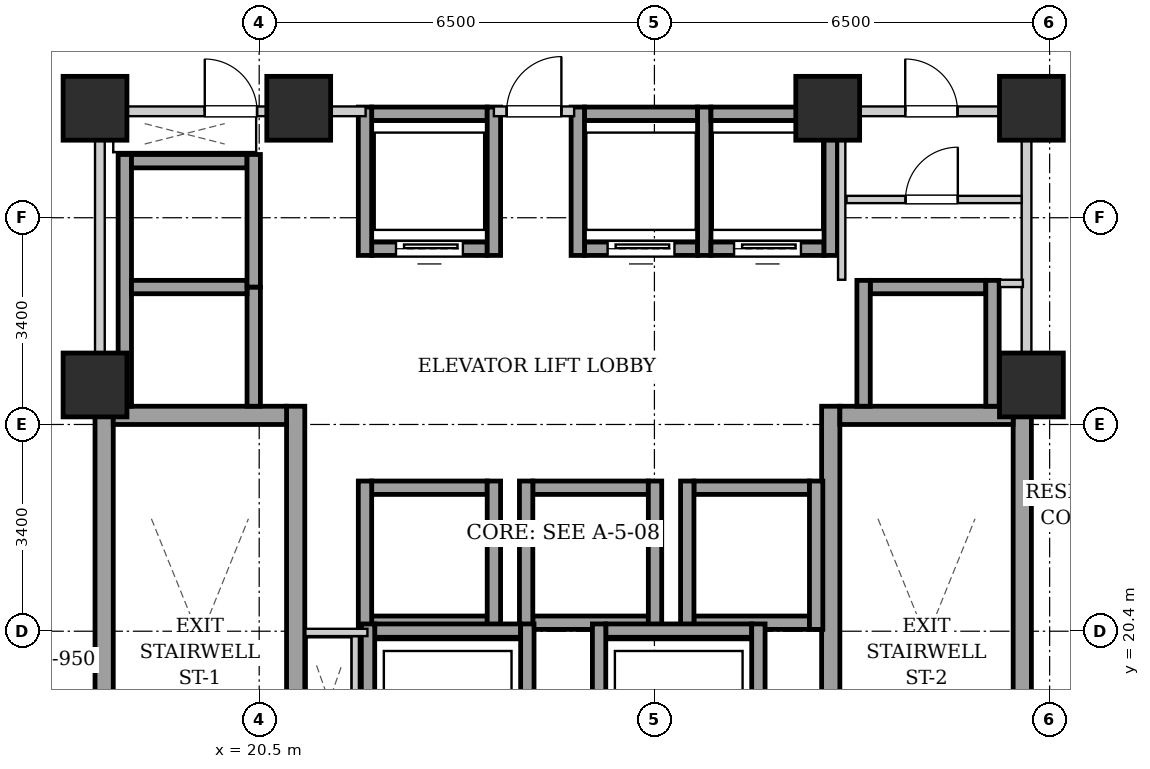
"""IFC4 building model, lengths in metres.
Left out: names, types, materials, properties, quantities, classifications, styles, units other than length and angle.
Written with IfcOpenShell. Run it as: python <this file> out.ifc"""

import sys

from ifc_helpers import new_model, si_unit, direction, frame, frame_2d, origin, origin_2d, place, context, subcontext, project, spatial, rectangle, extrude, element, fill, save


model = new_model("IFC4")
c1 = context("Model", 3, precision=1e-05, world=origin(), true_north=direction((0.0, 1.0)))
c2 = subcontext(c1, "Body", "Model", "MODEL_VIEW")
j1 = project(units=[si_unit("LENGTHUNIT", "METRE"), si_unit("PLANEANGLEUNIT", "RADIAN")], contexts=[c1])
p1 = place(None, origin())
s1 = spatial("IfcSite", under=j1, at=p1, CompositionType="ELEMENT")
p2 = place(p1, origin())
s2 = spatial("IfcBuilding", under=s1, at=p2, CompositionType="ELEMENT")
p3 = place(p2, frame((0.0, 0.0, 81.5)))
s3 = spatial("IfcBuildingStorey", under=s2, at=p3, CompositionType="ELEMENT", Elevation=81.5)
for number, where, z_axis, x_axis in (
    (1, (17.8, 29.0, 0.0), (0.0, 0.0, 1.0), (1.0, 0.0, 0.0)),
    (2, (21.15, 29.0, 0.0), (0.0, 0.0, 1.0), (1.0, 0.0, 0.0)),
    (3, (29.85, 29.0, 0.0), (0.0, 0.0, 1.0), (1.0, 0.0, 0.0)),
    (4, (33.2, 29.0, 0.0), (0.0, 0.0, 1.0), (1.0, 0.0, 0.0)),
    (5, (17.8, 24.45, 0.0), (0.0, 0.0, 1.0), (1.0, 0.0, 0.0)),
    (6, (33.2, 24.45, 0.0), (0.0, 0.0, 1.0), (1.0, 0.0, 0.0)),
):
    element("IfcColumn", number, at=place(p3, frame(where, z_axis=z_axis, x_axis=x_axis)), inside=s3, PredefinedType="COLUMN", context=c2, shape_type="SweptSolid", body=[
        extrude(rectangle(XDim=1.05, YDim=1.05, at=origin_2d()), origin(), (0.0, 0.0, 1.0), 3.2),
    ])
for number, where, z_axis, x_axis in (
    (7, (17.95, 15.1, 0.0), (0.0, 0.0, 1.0), (0.0, 1.0, 0.0)),
    (8, (21.1, 15.1, 0.0), (0.0, 0.0, 1.0), (0.0, 1.0, 0.0)),
):
    element("IfcWall", number, at=place(p3, frame(where, z_axis=z_axis, x_axis=x_axis)), inside=s3, PredefinedType="SHEAR", context=c2, shape_type="SweptSolid", body=[
        extrude(rectangle(XDim=9.0, YDim=0.3, at=frame_2d((4.5, 0.0))), origin(), (0.0, 0.0, 1.0), 2.94),
    ])
p4 = place(p3, frame((18.1, 23.95, 0.0), z_axis=(0.0, 0.0, 1.0), x_axis=(1.0, 0.0, 0.0)))
e9 = element("IfcWall", 9, at=p4, inside=s3, PredefinedType="SHEAR", context=c2, shape_type="SweptSolid", body=[
    extrude(rectangle(XDim=2.85, YDim=0.3, at=frame_2d((1.425, 0.0))), origin(), (0.0, 0.0, 1.0), 2.94),
])
for number, where, z_axis, x_axis in (
    (10, (29.9, 15.1, 0.0), (0.0, 0.0, 1.0), (0.0, 1.0, 0.0)),
    (11, (33.05, 15.1, 0.0), (0.0, 0.0, 1.0), (0.0, 1.0, 0.0)),
):
    element("IfcWall", number, at=place(p3, frame(where, z_axis=z_axis, x_axis=x_axis)), inside=s3, PredefinedType="SHEAR", context=c2, shape_type="SweptSolid", body=[
        extrude(rectangle(XDim=9.0, YDim=0.3, at=frame_2d((4.5, 0.0))), origin(), (0.0, 0.0, 1.0), 2.94),
    ])
p5 = place(p3, frame((30.05, 23.95, 0.0), z_axis=(0.0, 0.0, 1.0), x_axis=(1.0, 0.0, 0.0)))
e12 = element("IfcWall", 12, at=p5, inside=s3, PredefinedType="SHEAR", context=c2, shape_type="SweptSolid", body=[
    extrude(rectangle(XDim=2.85, YDim=0.3, at=frame_2d((1.425, 0.0))), origin(), (0.0, 0.0, 1.0), 2.94),
])
p6 = place(p3, frame((22.35, 26.69, 0.0), z_axis=(0.0, 0.0, 1.0), x_axis=(1.0, 0.0, 0.0)))
e13 = element("IfcWall", 13, at=p6, inside=s3, PredefinedType="SHEAR", context=c2, shape_type="SweptSolid", body=[
    extrude(rectangle(XDim=1.9, YDim=0.22, at=frame_2d((0.95, 0.0))), origin(), (0.0, 0.0, 1.0), 2.94),
])
p7 = place(p6, frame((0.4, 0.0, 0.0)))
e14 = element("IfcOpeningElement", 14, at=p7, cuts=e13, PredefinedType="OPENING", context=c2, shape_type="SweptSolid", body=[
    extrude(rectangle(XDim=1.1, YDim=2.15, at=frame_2d((0.55, 1.075))), frame((0.0, 0.12, 0.0), z_axis=(0.0, -1.0, 0.0), x_axis=(1.0, 0.0, 0.0)), (0.0, 0.0, 1.0), 0.24),
])
p8 = place(p3, frame((22.35, 28.91, 0.0), z_axis=(0.0, 0.0, 1.0), x_axis=(1.0, 0.0, 0.0)))
e15 = element("IfcWall", 15, at=p8, inside=s3, PredefinedType="SHEAR", context=c2, shape_type="SweptSolid", body=[
    extrude(rectangle(XDim=1.9, YDim=0.22, at=frame_2d((0.95, 0.0))), origin(), (0.0, 0.0, 1.0), 2.94),
])
for number, where, z_axis, x_axis in (
    (16, (22.24, 26.58, 0.0), (0.0, 0.0, 1.0), (0.0, 1.0, 0.0)),
    (17, (24.36, 26.58, 0.0), (0.0, 0.0, 1.0), (0.0, 1.0, 0.0)),
):
    element("IfcWall", number, at=place(p3, frame(where, z_axis=z_axis, x_axis=x_axis)), inside=s3, PredefinedType="SHEAR", context=c2, shape_type="SweptSolid", body=[
        extrude(rectangle(XDim=2.44, YDim=0.22, at=frame_2d((1.22, 0.0))), origin(), (0.0, 0.0, 1.0), 2.94),
    ])
p9 = place(p3, frame((25.85, 26.69, 0.0), z_axis=(0.0, 0.0, 1.0), x_axis=(1.0, 0.0, 0.0)))
e18 = element("IfcWall", 18, at=p9, inside=s3, PredefinedType="SHEAR", context=c2, shape_type="SweptSolid", body=[
    extrude(rectangle(XDim=1.86, YDim=0.22, at=frame_2d((0.93, 0.0))), origin(), (0.0, 0.0, 1.0), 2.94),
])
p10 = place(p9, frame((0.38, 0.0, 0.0)))
e19 = element("IfcOpeningElement", 19, at=p10, cuts=e18, PredefinedType="OPENING", context=c2, shape_type="SweptSolid", body=[
    extrude(rectangle(XDim=1.1, YDim=2.15, at=frame_2d((0.55, 1.075))), frame((0.0, 0.12, 0.0), z_axis=(0.0, -1.0, 0.0), x_axis=(1.0, 0.0, 0.0)), (0.0, 0.0, 1.0), 0.24),
])
p11 = place(p3, frame((25.85, 28.91, 0.0), z_axis=(0.0, 0.0, 1.0), x_axis=(1.0, 0.0, 0.0)))
e20 = element("IfcWall", 20, at=p11, inside=s3, PredefinedType="SHEAR", context=c2, shape_type="SweptSolid", body=[
    extrude(rectangle(XDim=1.86, YDim=0.22, at=frame_2d((0.93, 0.0))), origin(), (0.0, 0.0, 1.0), 2.94),
])
for number, where, z_axis, x_axis in (
    (21, (25.74, 26.58, 0.0), (0.0, 0.0, 1.0), (0.0, 1.0, 0.0)),
    (22, (27.82, 26.58, 0.0), (0.0, 0.0, 1.0), (0.0, 1.0, 0.0)),
):
    element("IfcWall", number, at=place(p3, frame(where, z_axis=z_axis, x_axis=x_axis)), inside=s3, PredefinedType="SHEAR", context=c2, shape_type="SweptSolid", body=[
        extrude(rectangle(XDim=2.44, YDim=0.22, at=frame_2d((1.22, 0.0))), origin(), (0.0, 0.0, 1.0), 2.94),
    ])
p12 = place(p3, frame((27.93, 26.69, 0.0), z_axis=(0.0, 0.0, 1.0), x_axis=(1.0, 0.0, 0.0)))
e23 = element("IfcWall", 23, at=p12, inside=s3, PredefinedType="SHEAR", context=c2, shape_type="SweptSolid", body=[
    extrude(rectangle(XDim=1.86, YDim=0.22, at=frame_2d((0.93, 0.0))), origin(), (0.0, 0.0, 1.0), 2.94),
])
p13 = place(p12, frame((0.38, 0.0, 0.0)))
e24 = element("IfcOpeningElement", 24, at=p13, cuts=e23, PredefinedType="OPENING", context=c2, shape_type="SweptSolid", body=[
    extrude(rectangle(XDim=1.1, YDim=2.15, at=frame_2d((0.55, 1.075))), frame((0.0, 0.12, 0.0), z_axis=(0.0, -1.0, 0.0), x_axis=(1.0, 0.0, 0.0)), (0.0, 0.0, 1.0), 0.24),
])
p14 = place(p3, frame((27.93, 28.91, 0.0), z_axis=(0.0, 0.0, 1.0), x_axis=(1.0, 0.0, 0.0)))
e25 = element("IfcWall", 25, at=p14, inside=s3, PredefinedType="SHEAR", context=c2, shape_type="SweptSolid", body=[
    extrude(rectangle(XDim=1.86, YDim=0.22, at=frame_2d((0.93, 0.0))), origin(), (0.0, 0.0, 1.0), 2.94),
])
p15 = place(p3, frame((29.9, 26.58, 0.0), z_axis=(0.0, 0.0, 1.0), x_axis=(0.0, 1.0, 0.0)))
e26 = element("IfcWall", 26, at=p15, inside=s3, PredefinedType="SHEAR", context=c2, shape_type="SweptSolid", body=[
    extrude(rectangle(XDim=2.44, YDim=0.22, at=frame_2d((1.22, 0.0))), origin(), (0.0, 0.0, 1.0), 2.94),
])
for number, where, z_axis, x_axis in (
    (27, (22.35, 20.54, 0.0), (0.0, 0.0, 1.0), (1.0, 0.0, 0.0)),
    (28, (22.35, 22.76, 0.0), (0.0, 0.0, 1.0), (1.0, 0.0, 0.0)),
):
    element("IfcWall", number, at=place(p3, frame(where, z_axis=z_axis, x_axis=x_axis)), inside=s3, PredefinedType="SHEAR", context=c2, shape_type="SweptSolid", body=[
        extrude(rectangle(XDim=1.9, YDim=0.22, at=frame_2d((0.95, 0.0))), origin(), (0.0, 0.0, 1.0), 2.94),
    ])
for number, where, z_axis, x_axis in (
    (29, (22.24, 20.43, 0.0), (0.0, 0.0, 1.0), (0.0, 1.0, 0.0)),
    (30, (24.36, 20.43, 0.0), (0.0, 0.0, 1.0), (0.0, 1.0, 0.0)),
):
    element("IfcWall", number, at=place(p3, frame(where, z_axis=z_axis, x_axis=x_axis)), inside=s3, PredefinedType="SHEAR", context=c2, shape_type="SweptSolid", body=[
        extrude(rectangle(XDim=2.44, YDim=0.22, at=frame_2d((1.22, 0.0))), origin(), (0.0, 0.0, 1.0), 2.94),
    ])
for number, where, z_axis, x_axis in (
    (31, (25.0, 20.54, 0.0), (0.0, 0.0, 1.0), (1.0, 0.0, 0.0)),
    (32, (25.0, 22.76, 0.0), (0.0, 0.0, 1.0), (1.0, 0.0, 0.0)),
):
    element("IfcWall", number, at=place(p3, frame(where, z_axis=z_axis, x_axis=x_axis)), inside=s3, PredefinedType="SHEAR", context=c2, shape_type="SweptSolid", body=[
        extrude(rectangle(XDim=1.9, YDim=0.22, at=frame_2d((0.95, 0.0))), origin(), (0.0, 0.0, 1.0), 2.94),
    ])
for number, where, z_axis, x_axis in (
    (33, (24.89, 20.43, 0.0), (0.0, 0.0, 1.0), (0.0, 1.0, 0.0)),
    (34, (27.01, 20.43, 0.0), (0.0, 0.0, 1.0), (0.0, 1.0, 0.0)),
):
    element("IfcWall", number, at=place(p3, frame(where, z_axis=z_axis, x_axis=x_axis)), inside=s3, PredefinedType="SHEAR", context=c2, shape_type="SweptSolid", body=[
        extrude(rectangle(XDim=2.44, YDim=0.22, at=frame_2d((1.22, 0.0))), origin(), (0.0, 0.0, 1.0), 2.94),
    ])
for number, where, z_axis, x_axis in (
    (35, (27.65, 20.54, 0.0), (0.0, 0.0, 1.0), (1.0, 0.0, 0.0)),
    (36, (27.65, 22.76, 0.0), (0.0, 0.0, 1.0), (1.0, 0.0, 0.0)),
):
    element("IfcWall", number, at=place(p3, frame(where, z_axis=z_axis, x_axis=x_axis)), inside=s3, PredefinedType="SHEAR", context=c2, shape_type="SweptSolid", body=[
        extrude(rectangle(XDim=1.9, YDim=0.22, at=frame_2d((0.95, 0.0))), origin(), (0.0, 0.0, 1.0), 2.94),
    ])
for number, where, z_axis, x_axis in (
    (37, (27.54, 20.43, 0.0), (0.0, 0.0, 1.0), (0.0, 1.0, 0.0)),
    (38, (29.66, 20.43, 0.0), (0.0, 0.0, 1.0), (0.0, 1.0, 0.0)),
):
    element("IfcWall", number, at=place(p3, frame(where, z_axis=z_axis, x_axis=x_axis)), inside=s3, PredefinedType="SHEAR", context=c2, shape_type="SweptSolid", body=[
        extrude(rectangle(XDim=2.44, YDim=0.22, at=frame_2d((1.22, 0.0))), origin(), (0.0, 0.0, 1.0), 2.94),
    ])
p16 = place(p3, frame((18.29, 24.1, 0.0), z_axis=(0.0, 0.0, 1.0), x_axis=(0.0, 1.0, 0.0)))
e39 = element("IfcWall", 39, at=p16, inside=s3, PredefinedType="SHEAR", context=c2, shape_type="SweptSolid", body=[
    extrude(rectangle(XDim=4.14, YDim=0.22, at=frame_2d((2.07, 0.0))), origin(), (0.0, 0.0, 1.0), 2.94),
])
p17 = place(p3, frame((20.41, 24.1, 0.0), z_axis=(0.0, 0.0, 1.0), x_axis=(0.0, 1.0, 0.0)))
e40 = element("IfcWall", 40, at=p17, inside=s3, PredefinedType="SHEAR", context=c2, shape_type="SweptSolid", body=[
    extrude(rectangle(XDim=1.96, YDim=0.22, at=frame_2d((0.98, 0.0))), origin(), (0.0, 0.0, 1.0), 2.94),
])
for number, where, z_axis, x_axis in (
    (41, (18.4, 26.06, 0.0), (0.0, 0.0, 1.0), (1.0, 0.0, 0.0)),
    (42, (18.4, 28.13, 0.0), (0.0, 0.0, 1.0), (1.0, 0.0, 0.0)),
):
    element("IfcWall", number, at=place(p3, frame(where, z_axis=z_axis, x_axis=x_axis)), inside=s3, PredefinedType="SHEAR", context=c2, shape_type="SweptSolid", body=[
        extrude(rectangle(XDim=1.9, YDim=0.22, at=frame_2d((0.95, 0.0))), origin(), (0.0, 0.0, 1.0), 2.94),
    ])
p18 = place(p3, frame((20.41, 26.06, 0.0), z_axis=(0.0, 0.0, 1.0), x_axis=(0.0, 1.0, 0.0)))
e43 = element("IfcWall", 43, at=p18, inside=s3, PredefinedType="SHEAR", context=c2, shape_type="SweptSolid", body=[
    extrude(rectangle(XDim=2.18, YDim=0.22, at=frame_2d((1.09, 0.0))), origin(), (0.0, 0.0, 1.0), 2.94),
])
p19 = place(p3, frame((30.55, 26.06, 0.0), z_axis=(0.0, 0.0, 1.0), x_axis=(1.0, 0.0, 0.0)))
e44 = element("IfcWall", 44, at=p19, inside=s3, PredefinedType="SHEAR", context=c2, shape_type="SweptSolid", body=[
    extrude(rectangle(XDim=1.9, YDim=0.22, at=frame_2d((0.95, 0.0))), origin(), (0.0, 0.0, 1.0), 2.94),
])
for number, where, z_axis, x_axis in (
    (45, (30.44, 24.1, 0.0), (0.0, 0.0, 1.0), (0.0, 1.0, 0.0)),
    (46, (32.56, 24.1, 0.0), (0.0, 0.0, 1.0), (0.0, 1.0, 0.0)),
):
    element("IfcWall", number, at=place(p3, frame(where, z_axis=z_axis, x_axis=x_axis)), inside=s3, PredefinedType="SHEAR", context=c2, shape_type="SweptSolid", body=[
        extrude(rectangle(XDim=2.07, YDim=0.22, at=frame_2d((1.035, 0.0))), origin(), (0.0, 0.0, 1.0), 2.94),
    ])
p20 = place(p3, frame((22.4, 20.41, 0.0), z_axis=(0.0, 0.0, 1.0), x_axis=(1.0, 0.0, 0.0)))
e47 = element("IfcWall", 47, at=p20, inside=s3, PredefinedType="SHEAR", context=c2, shape_type="SweptSolid", body=[
    extrude(rectangle(XDim=2.4, YDim=0.22, at=frame_2d((1.2, 0.0))), origin(), (0.0, 0.0, 1.0), 2.94),
])
for number, where, z_axis, x_axis in (
    (48, (22.29, 17.98, 0.0), (0.0, 0.0, 1.0), (0.0, 1.0, 0.0)),
    (49, (24.91, 17.98, 0.0), (0.0, 0.0, 1.0), (0.0, 1.0, 0.0)),
):
    element("IfcWall", number, at=place(p3, frame(where, z_axis=z_axis, x_axis=x_axis)), inside=s3, PredefinedType="SHEAR", context=c2, shape_type="SweptSolid", body=[
        extrude(rectangle(XDim=2.54, YDim=0.22, at=frame_2d((1.27, 0.0))), origin(), (0.0, 0.0, 1.0), 2.94),
    ])
p21 = place(p3, frame((26.2, 20.41, 0.0), z_axis=(0.0, 0.0, 1.0), x_axis=(1.0, 0.0, 0.0)))
e50 = element("IfcWall", 50, at=p21, inside=s3, PredefinedType="SHEAR", context=c2, shape_type="SweptSolid", body=[
    extrude(rectangle(XDim=2.4, YDim=0.22, at=frame_2d((1.2, 0.0))), origin(), (0.0, 0.0, 1.0), 2.94),
])
for number, where, z_axis, x_axis in (
    (51, (26.09, 17.98, 0.0), (0.0, 0.0, 1.0), (0.0, 1.0, 0.0)),
    (52, (28.71, 17.98, 0.0), (0.0, 0.0, 1.0), (0.0, 1.0, 0.0)),
):
    element("IfcWall", number, at=place(p3, frame(where, z_axis=z_axis, x_axis=x_axis)), inside=s3, PredefinedType="SHEAR", context=c2, shape_type="SweptSolid", body=[
        extrude(rectangle(XDim=2.54, YDim=0.22, at=frame_2d((1.27, 0.0))), origin(), (0.0, 0.0, 1.0), 2.94),
    ])
for number, where, z_axis, x_axis in (
    (53, (17.88, 24.12, 0.0), (0.0, 0.0, 1.0), (0.0, 1.0, 0.0)),
    (54, (33.12, 24.12, 0.0), (0.0, 0.0, 1.0), (0.0, 1.0, 0.0)),
):
    element("IfcWall", number, at=place(p3, frame(where, z_axis=z_axis, x_axis=x_axis)), inside=s3, PredefinedType="PARTITIONING", context=c2, shape_type="SweptSolid", body=[
        extrude(rectangle(XDim=4.76, YDim=0.16, at=frame_2d((2.38, 0.0))), origin(), (0.0, 0.0, 1.0), 2.94),
    ])
p22 = place(p3, frame((24.36, 28.95, 0.0), z_axis=(0.0, 0.0, 1.0), x_axis=(1.0, 0.0, 0.0)))
e55 = element("IfcWall", 55, at=p22, inside=s3, PredefinedType="PARTITIONING", context=c2, shape_type="SweptSolid", body=[
    extrude(rectangle(XDim=1.32, YDim=0.16, at=frame_2d((0.66, 0.0))), origin(), (0.0, 0.0, 1.0), 2.309),
])
p23 = place(p22, frame((0.21, 0.0, 0.0)))
e56 = element("IfcOpeningElement", 56, at=p23, cuts=e55, PredefinedType="OPENING", context=c2, shape_type="SweptSolid", body=[
    extrude(rectangle(XDim=0.9, YDim=2.05, at=frame_2d((0.45, 1.025))), frame((0.0, 0.09, 0.0), z_axis=(0.0, -1.0, 0.0), x_axis=(1.0, 0.0, 0.0)), (0.0, 0.0, 1.0), 0.18),
])
p24 = place(p3, frame((17.96, 28.95, 0.0), z_axis=(0.0, 0.0, 1.0), x_axis=(1.0, 0.0, 0.0)))
e57 = element("IfcWall", 57, at=p24, inside=s3, PredefinedType="PARTITIONING", context=c2, shape_type="SweptSolid", body=[
    extrude(rectangle(XDim=4.29, YDim=0.16, at=frame_2d((2.145, 0.0))), origin(), (0.0, 0.0, 1.0), 2.309),
])
p25 = place(p24, frame((1.645, 0.0, 0.0)))
e58 = element("IfcOpeningElement", 58, at=p25, cuts=e57, PredefinedType="OPENING", context=c2, shape_type="SweptSolid", body=[
    extrude(rectangle(XDim=0.86, YDim=2.05, at=frame_2d((0.43, 1.025))), frame((0.0, 0.09, 0.0), z_axis=(0.0, -1.0, 0.0), x_axis=(1.0, 0.0, 0.0)), (0.0, 0.0, 1.0), 0.18),
])
p26 = place(p3, frame((22.08, 18.2, 0.0), z_axis=(0.0, 0.0, 1.0), x_axis=(0.0, 1.0, 0.0)))
e59 = element("IfcWall", 59, at=p26, inside=s3, PredefinedType="PARTITIONING", context=c2, shape_type="SweptSolid", body=[
    extrude(rectangle(XDim=2.12, YDim=0.12, at=frame_2d((1.06, 0.0))), origin(), (0.0, 0.0, 1.0), 2.94),
])
p27 = place(p3, frame((22.28, 20.38, 0.0), z_axis=(0.0, 0.0, 1.0), x_axis=(-1.0, 0.0, 0.0)))
e60 = element("IfcWall", 60, at=p27, inside=s3, PredefinedType="PARTITIONING", context=c2, shape_type="SweptSolid", body=[
    extrude(rectangle(XDim=1.02, YDim=0.12, at=frame_2d((0.51, 0.0))), origin(), (0.0, 0.0, 1.0), 2.94),
])
p28 = place(p3, frame((30.08, 26.18, 0.0), z_axis=(0.0, 0.0, 1.0), x_axis=(0.0, 1.0, 0.0)))
e61 = element("IfcWall", 61, at=p28, inside=s3, PredefinedType="PARTITIONING", context=c2, shape_type="SweptSolid", body=[
    extrude(rectangle(XDim=2.68, YDim=0.12, at=frame_2d((1.34, 0.0))), origin(), (0.0, 0.0, 1.0), 2.94),
])
p29 = place(p3, frame((32.68, 26.12, 0.0), z_axis=(0.0, 0.0, 1.0), x_axis=(1.0, 0.0, 0.0)))
e62 = element("IfcWall", 62, at=p29, inside=s3, PredefinedType="PARTITIONING", context=c2, shape_type="SweptSolid", body=[
    extrude(rectangle(XDim=0.38, YDim=0.12, at=frame_2d((0.19, 0.0))), origin(), (0.0, 0.0, 1.0), 2.94),
])
p30 = place(p3, frame((30.16, 27.5, 0.0), z_axis=(0.0, 0.0, 1.0), x_axis=(1.0, 0.0, 0.0)))
e63 = element("IfcWall", 63, at=p30, inside=s3, PredefinedType="PARTITIONING", context=c2, shape_type="SweptSolid", body=[
    extrude(rectangle(XDim=2.88, YDim=0.12, at=frame_2d((1.44, 0.0))), origin(), (0.0, 0.0, 1.0), 2.94),
])
p31 = place(p30, frame((0.97, 0.0, 0.0)))
e64 = element("IfcOpeningElement", 64, at=p31, cuts=e63, PredefinedType="OPENING", context=c2, shape_type="SweptSolid", body=[
    extrude(rectangle(XDim=0.86, YDim=2.05, at=frame_2d((0.43, 1.025))), frame((0.0, 0.07, 0.0), z_axis=(0.0, -1.0, 0.0), x_axis=(1.0, 0.0, 0.0)), (0.0, 0.0, 1.0), 0.14),
])
p32 = place(p3, frame((30.08, 28.95, 0.0), z_axis=(0.0, 0.0, 1.0), x_axis=(1.0, 0.0, 0.0)))
e65 = element("IfcWall", 65, at=p32, inside=s3, PredefinedType="PARTITIONING", context=c2, shape_type="SweptSolid", body=[
    extrude(rectangle(XDim=2.96, YDim=0.16, at=frame_2d((1.48, 0.0))), origin(), (0.0, 0.0, 1.0), 2.94),
])
p33 = place(p32, frame((1.045, 0.0, 0.0)))
e66 = element("IfcOpeningElement", 66, at=p33, cuts=e65, PredefinedType="OPENING", context=c2, shape_type="SweptSolid", body=[
    extrude(rectangle(XDim=0.86, YDim=2.05, at=frame_2d((0.43, 1.025))), frame((0.0, 0.09, 0.0), z_axis=(0.0, -1.0, 0.0), x_axis=(1.0, 0.0, 0.0)), (0.0, 0.0, 1.0), 0.18),
])
p34 = place(p7, origin())
e67 = element("IfcDoor", 67, at=p34, inside=s3, OperationType="SLIDING_TO_LEFT", PredefinedType="DOOR", context=c2, shape_type="SweptSolid", body=[
    extrude(rectangle(XDim=1.1, YDim=2.15, at=frame_2d((0.55, 1.075))), frame((0.0, 0.025, 0.0), z_axis=(0.0, -1.0, 0.0), x_axis=(1.0, 0.0, 0.0)), (0.0, 0.0, 1.0), 0.05),
])
fill(e14, e67)
p35 = place(p10, origin())
e68 = element("IfcDoor", 68, at=p35, inside=s3, OperationType="SLIDING_TO_LEFT", PredefinedType="DOOR", context=c2, shape_type="SweptSolid", body=[
    extrude(rectangle(XDim=1.1, YDim=2.15, at=frame_2d((0.55, 1.075))), frame((0.0, 0.025, 0.0), z_axis=(0.0, -1.0, 0.0), x_axis=(1.0, 0.0, 0.0)), (0.0, 0.0, 1.0), 0.05),
])
fill(e19, e68)
p36 = place(p13, origin())
e69 = element("IfcDoor", 69, at=p36, inside=s3, OperationType="SLIDING_TO_LEFT", PredefinedType="DOOR", context=c2, shape_type="SweptSolid", body=[
    extrude(rectangle(XDim=1.1, YDim=2.15, at=frame_2d((0.55, 1.075))), frame((0.0, 0.025, 0.0), z_axis=(0.0, -1.0, 0.0), x_axis=(1.0, 0.0, 0.0)), (0.0, 0.0, 1.0), 0.05),
])
fill(e24, e69)
p37 = place(p23, origin())
e70 = element("IfcDoor", 70, at=p37, inside=s3, OperationType="SINGLE_SWING_RIGHT", PredefinedType="DOOR", context=c2, shape_type="SweptSolid", body=[
    extrude(rectangle(XDim=0.9, YDim=2.05, at=frame_2d((0.45, 1.025))), frame((0.0, 0.025, 0.0), z_axis=(0.0, -1.0, 0.0), x_axis=(1.0, 0.0, 0.0)), (0.0, 0.0, 1.0), 0.05),
])
fill(e56, e70)
p38 = place(p25, origin())
e71 = element("IfcDoor", 71, at=p38, inside=s3, OperationType="SINGLE_SWING_LEFT", PredefinedType="DOOR", context=c2, shape_type="SweptSolid", body=[
    extrude(rectangle(XDim=0.86, YDim=2.05, at=frame_2d((0.43, 1.025))), frame((0.0, 0.025, 0.0), z_axis=(0.0, -1.0, 0.0), x_axis=(1.0, 0.0, 0.0)), (0.0, 0.0, 1.0), 0.05),
])
fill(e58, e71)
p39 = place(p31, origin())
e72 = element("IfcDoor", 72, at=p39, inside=s3, OperationType="SINGLE_SWING_RIGHT", PredefinedType="DOOR", context=c2, shape_type="SweptSolid", body=[
    extrude(rectangle(XDim=0.86, YDim=2.05, at=frame_2d((0.43, 1.025))), frame((0.0, 0.025, 0.0), z_axis=(0.0, -1.0, 0.0), x_axis=(1.0, 0.0, 0.0)), (0.0, 0.0, 1.0), 0.05),
])
fill(e64, e72)
p40 = place(p33, origin())
e73 = element("IfcDoor", 73, at=p40, inside=s3, OperationType="SINGLE_SWING_LEFT", PredefinedType="DOOR", context=c2, shape_type="SweptSolid", body=[
    extrude(rectangle(XDim=0.86, YDim=2.05, at=frame_2d((0.43, 1.025))), frame((0.0, 0.025, 0.0), z_axis=(0.0, -1.0, 0.0), x_axis=(1.0, 0.0, 0.0)), (0.0, 0.0, 1.0), 0.05),
])
fill(e66, e73)
save(model, sys.argv[1])
